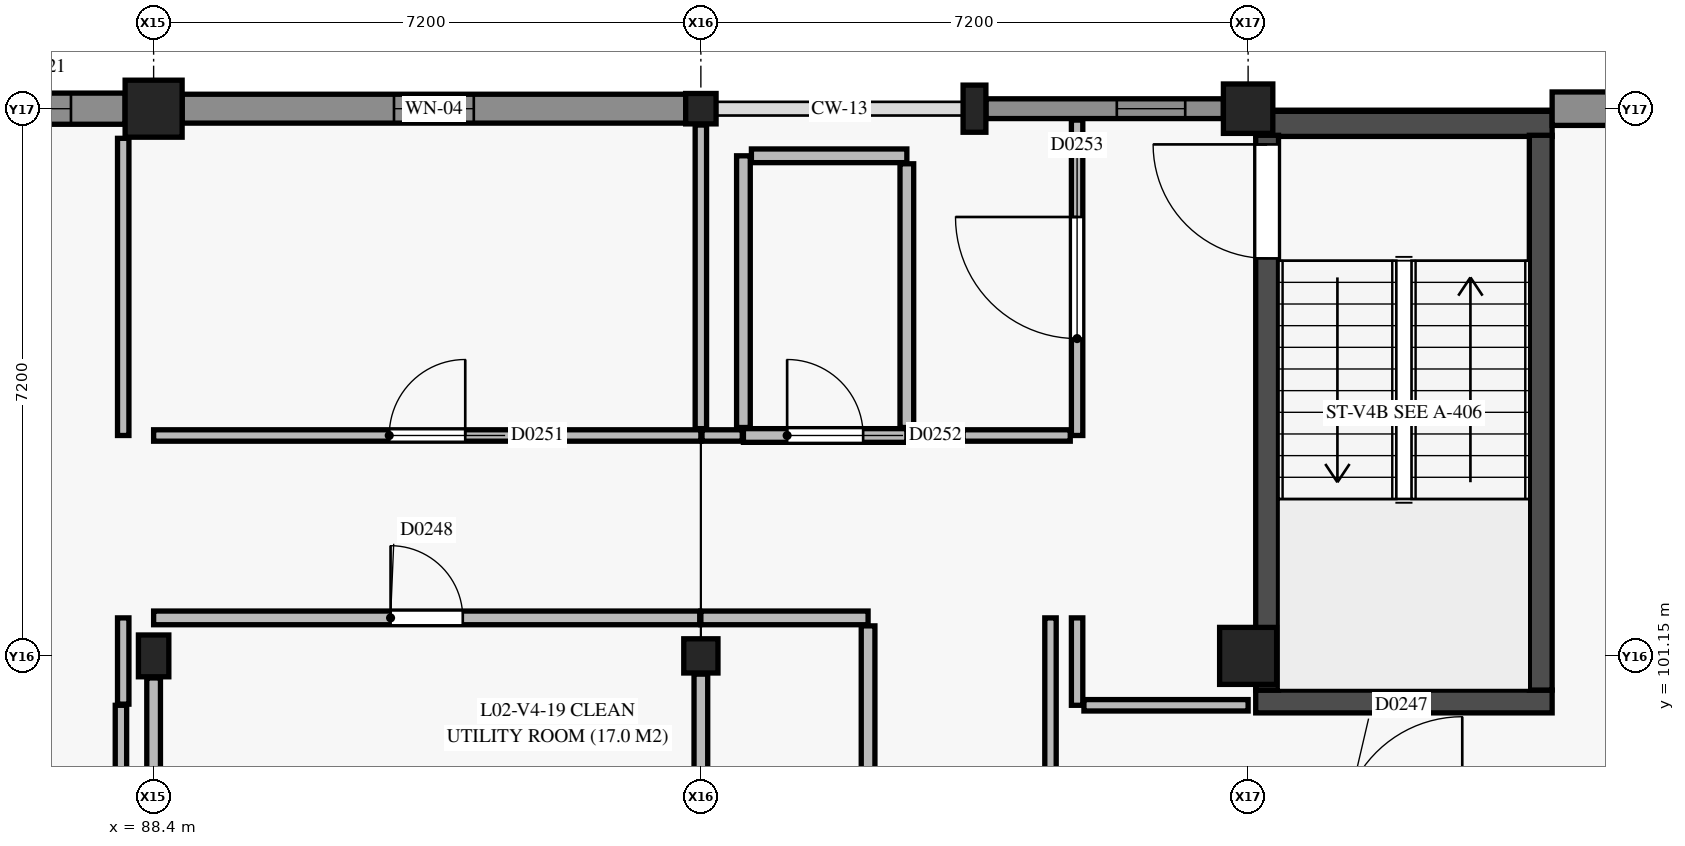
"""IFC4 building model, lengths in metres.
Left out: names, types, materials, properties, quantities, classifications, styles, units other than length and angle.
Written with IfcOpenShell. Run it as: python <this file> out.ifc"""

import sys

from ifc_helpers import new_model, si_unit, direction, frame, frame_2d, origin, origin_2d, place, context, subcontext, project, spatial, rectangle, circle, extrude, element, fill, save


model = new_model("IFC4")
c1 = context("Model", 3, precision=1e-05, world=origin(), true_north=direction((0.0, 1.0)))
c2 = subcontext(c1, "Body", "Model", "MODEL_VIEW")
j1 = project(units=[si_unit("LENGTHUNIT", "METRE"), si_unit("PLANEANGLEUNIT", "RADIAN")], contexts=[c1])
p1 = place(None, origin())
s1 = spatial("IfcSite", under=j1, at=p1, CompositionType="ELEMENT")
p2 = place(p1, origin())
s2 = spatial("IfcBuilding", under=s1, at=p2, CompositionType="ELEMENT")
p3 = place(p2, frame((0.0, 0.0, 9.0)))
s3 = spatial("IfcBuildingStorey", under=s2, at=p3, CompositionType="ELEMENT", Elevation=9.0)
p4 = place(p3, frame((88.4, 101.15, 0.0), z_axis=(0.0, 0.0, 1.0), x_axis=(1.0, 0.0, 0.0)))
e1 = element("IfcColumn", 1, at=p4, inside=s3, PredefinedType="COLUMN", context=c2, shape_type="SweptSolid", body=[
    extrude(rectangle(XDim=0.4, YDim=0.55, at=origin_2d()), origin(), (0.0, 0.0, 1.0), 4.2),
])
p5 = place(p3, frame((88.4, 108.35, 0.0), z_axis=(0.0, 0.0, 1.0), x_axis=(1.0, 0.0, 0.0)))
e2 = element("IfcColumn", 2, at=p5, inside=s3, PredefinedType="COLUMN", context=c2, shape_type="SweptSolid", body=[
    extrude(rectangle(XDim=0.75, YDim=0.75, at=origin_2d()), origin(), (0.0, 0.0, 1.0), 4.2),
])
p6 = place(p3, frame((95.6, 101.15, 0.0), z_axis=(0.0, 0.0, 1.0), x_axis=(1.0, 0.0, 0.0)))
e3 = element("IfcColumn", 3, at=p6, inside=s3, PredefinedType="COLUMN", context=c2, shape_type="SweptSolid", body=[
    extrude(rectangle(XDim=0.45, YDim=0.45, at=origin_2d()), origin(), (0.0, 0.0, 1.0), 4.2),
])
p7 = place(p3, frame((95.6, 108.35, 0.0), z_axis=(0.0, 0.0, 1.0), x_axis=(1.0, 0.0, 0.0)))
e4 = element("IfcColumn", 4, at=p7, inside=s3, PredefinedType="COLUMN", context=c2, shape_type="SweptSolid", body=[
    extrude(rectangle(XDim=0.4, YDim=0.4, at=origin_2d()), origin(), (0.0, 0.0, 1.0), 4.2),
])
p8 = place(p3, frame((102.8, 101.15, 0.0), z_axis=(0.0, 0.0, 1.0), x_axis=(1.0, 0.0, 0.0)))
e5 = element("IfcColumn", 5, at=p8, inside=s3, PredefinedType="COLUMN", context=c2, shape_type="SweptSolid", body=[
    extrude(rectangle(XDim=0.75, YDim=0.75, at=origin_2d()), origin(), (0.0, 0.0, 1.0), 4.2),
])
p9 = place(p3, frame((102.8, 108.35, 0.0), z_axis=(0.0, 0.0, 1.0), x_axis=(1.0, 0.0, 0.0)))
e6 = element("IfcColumn", 6, at=p9, inside=s3, PredefinedType="COLUMN", context=c2, shape_type="SweptSolid", body=[
    extrude(circle(Radius=0.325, at=origin_2d()), origin(), (0.0, 0.0, 1.0), 4.2),
])
p10 = place(p3, frame((99.2, 108.35, 0.0), z_axis=(0.0, 0.0, 1.0), x_axis=(1.0, 0.0, 0.0)))
e7 = element("IfcColumn", 7, at=p10, inside=s3, PredefinedType="PILASTER", context=c2, shape_type="SweptSolid", body=[
    extrude(rectangle(XDim=0.3, YDim=0.62, at=origin_2d()), origin(), (0.0, 0.0, 1.0), 4.2),
])
p11 = place(p3, frame((102.9, 100.55, 0.0), z_axis=(0.0, 0.0, 1.0), x_axis=(1.0, 0.0, 0.0)))
e8 = element("IfcWall", 8, at=p11, inside=s3, PredefinedType="SHEAR", context=c2, shape_type="SweptSolid", body=[
    extrude(rectangle(XDim=3.9, YDim=0.3, at=frame_2d((1.95, 0.0))), origin(), (0.0, 0.0, 1.0), 3.95),
])
p12 = place(p3, frame((102.9, 108.15, 0.0), z_axis=(0.0, 0.0, 1.0), x_axis=(1.0, 0.0, 0.0)))
e9 = element("IfcWall", 9, at=p12, inside=s3, PredefinedType="SHEAR", context=c2, shape_type="SweptSolid", body=[
    extrude(rectangle(XDim=3.9, YDim=0.33, at=frame_2d((1.95, 0.0))), origin(), (0.0, 0.0, 1.0), 3.95),
])
p13 = place(p3, frame((103.05, 100.7, 0.0), z_axis=(0.0, 0.0, 1.0), x_axis=(0.0, 1.0, 0.0)))
e10 = element("IfcWall", 10, at=p13, inside=s3, PredefinedType="SHEAR", context=c2, shape_type="SweptSolid", body=[
    extrude(rectangle(XDim=7.3, YDim=0.3, at=frame_2d((3.65, 0.0))), origin(), (0.0, 0.0, 1.0), 3.95),
])
p14 = place(p13, frame((5.68, 0.0, 0.0)))
e11 = element("IfcOpeningElement", 11, at=p14, cuts=e10, PredefinedType="OPENING", context=c2, shape_type="SweptSolid", body=[
    extrude(rectangle(XDim=1.5, YDim=2.15, at=frame_2d((0.75, 1.075))), frame((0.0, 0.16, 0.0), z_axis=(0.0, -1.0, 0.0), x_axis=(1.0, 0.0, 0.0)), (0.0, 0.0, 1.0), 0.32),
])
p15 = place(p3, frame((106.65, 100.7, 0.0), z_axis=(0.0, 0.0, 1.0), x_axis=(0.0, 1.0, 0.0)))
e12 = element("IfcWall", 12, at=p15, inside=s3, PredefinedType="SHEAR", context=c2, shape_type="SweptSolid", body=[
    extrude(rectangle(XDim=7.3, YDim=0.3, at=frame_2d((3.65, 0.0))), origin(), (0.0, 0.0, 1.0), 3.95),
])
p16 = place(p3, frame((85.7, 108.35, 0.0), z_axis=(0.0, 0.0, 1.0), x_axis=(1.0, 0.0, 0.0)))
e13 = element("IfcWall", 13, at=p16, inside=s3, PredefinedType="USERDEFINED", context=c2, shape_type="SweptSolid", body=[
    extrude(rectangle(XDim=2.325, YDim=0.41, at=frame_2d((1.163, 0.0))), origin(), (0.0, 0.0, 1.0), 3.13),
])
p17 = place(p16, frame((0.712, 0.0, 0.95)))
e14 = element("IfcOpeningElement", 14, at=p17, cuts=e13, PredefinedType="OPENING", context=c2, shape_type="SweptSolid", body=[
    extrude(rectangle(XDim=0.9, YDim=1.2, at=frame_2d((0.45, 0.6))), frame((0.0, 0.215, 0.0), z_axis=(0.0, -1.0, 0.0), x_axis=(1.0, 0.0, 0.0)), (0.0, 0.0, 1.0), 0.43),
])
p18 = place(p3, frame((88.775, 108.35, 0.0), z_axis=(0.0, 0.0, 1.0), x_axis=(1.0, 0.0, 0.0)))
e15 = element("IfcWall", 15, at=p18, inside=s3, PredefinedType="USERDEFINED", context=c2, shape_type="SweptSolid", body=[
    extrude(rectangle(XDim=6.625, YDim=0.38, at=frame_2d((3.312, 0.0))), origin(), (0.0, 0.0, 1.0), 3.13),
])
p19 = place(p18, frame((2.788, 0.0, 0.9)))
e16 = element("IfcOpeningElement", 16, at=p19, cuts=e15, PredefinedType="OPENING", context=c2, shape_type="SweptSolid", body=[
    extrude(rectangle(XDim=1.05, YDim=1.8, at=frame_2d((0.525, 0.9))), frame((0.0, 0.2, 0.0), z_axis=(0.0, -1.0, 0.0), x_axis=(1.0, 0.0, 0.0)), (0.0, 0.0, 1.0), 0.4),
])
p20 = place(p3, frame((99.35, 108.35, 0.0), z_axis=(0.0, 0.0, 1.0), x_axis=(1.0, 0.0, 0.0)))
e17 = element("IfcWall", 17, at=p20, inside=s3, PredefinedType="SOLIDWALL", context=c2, shape_type="SweptSolid", body=[
    extrude(rectangle(XDim=3.125, YDim=0.26, at=frame_2d((1.562, 0.0))), origin(), (0.0, 0.0, 1.0), 3.13),
])
p21 = place(p20, frame((1.722, 0.0, 0.95)))
e18 = element("IfcOpeningElement", 18, at=p21, cuts=e17, PredefinedType="OPENING", context=c2, shape_type="SweptSolid", body=[
    extrude(rectangle(XDim=0.9, YDim=1.2, at=frame_2d((0.45, 0.6))), frame((0.0, 0.14, 0.0), z_axis=(0.0, -1.0, 0.0), x_axis=(1.0, 0.0, 0.0)), (0.0, 0.0, 1.0), 0.28),
])
p22 = place(p3, frame((106.8, 108.35, 0.0), z_axis=(0.0, 0.0, 1.0), x_axis=(1.0, 0.0, 0.0)))
e19 = element("IfcWall", 19, at=p22, inside=s3, PredefinedType="USERDEFINED", context=c2, shape_type="SweptSolid", body=[
    extrude(rectangle(XDim=2.95, YDim=0.44, at=frame_2d((1.475, 0.0))), origin(), (0.0, 0.0, 1.0), 3.13),
])
p23 = place(p22, frame((1.025, 0.0, 0.9)))
e20 = element("IfcOpeningElement", 20, at=p23, cuts=e19, PredefinedType="OPENING", context=c2, shape_type="SweptSolid", body=[
    extrude(rectangle(XDim=0.9, YDim=1.2, at=frame_2d((0.45, 0.6))), frame((0.0, 0.23, 0.0), z_axis=(0.0, -1.0, 0.0), x_axis=(1.0, 0.0, 0.0)), (0.0, 0.0, 1.0), 0.46),
])
p24 = place(p3, frame((96.16, 104.05, 0.0), z_axis=(0.0, 0.0, 1.0), x_axis=(1.0, 0.0, 0.0)))
e21 = element("IfcWall", 21, at=p24, inside=s3, PredefinedType="PLUMBINGWALL", context=c2, shape_type="SweptSolid", body=[
    extrude(rectangle(XDim=2.15, YDim=0.18, at=frame_2d((1.075, 0.0))), origin(), (0.0, 0.0, 1.0), 3.95),
])
p25 = place(p24, frame((0.575, 0.0, 0.0)))
e22 = element("IfcOpeningElement", 22, at=p25, cuts=e21, PredefinedType="OPENING", context=c2, shape_type="SweptSolid", body=[
    extrude(rectangle(XDim=1.0, YDim=2.15, at=frame_2d((0.5, 1.075))), frame((0.0, 0.1, 0.0), z_axis=(0.0, -1.0, 0.0), x_axis=(1.0, 0.0, 0.0)), (0.0, 0.0, 1.0), 0.2),
])
p26 = place(p3, frame((96.16, 104.155, 0.0), z_axis=(0.0, 0.0, 1.0), x_axis=(0.0, 1.0, 0.0)))
e23 = element("IfcWall", 23, at=p26, inside=s3, PredefinedType="PLUMBINGWALL", context=c2, shape_type="SweptSolid", body=[
    extrude(rectangle(XDim=3.575, YDim=0.18, at=frame_2d((1.788, 0.0))), origin(), (0.0, 0.0, 1.0), 3.475),
])
p27 = place(p3, frame((96.265, 107.73, 0.0), z_axis=(0.0, 0.0, 1.0), x_axis=(1.0, 0.0, 0.0)))
e24 = element("IfcWall", 24, at=p27, inside=s3, PredefinedType="PLUMBINGWALL", context=c2, shape_type="SweptSolid", body=[
    extrude(rectangle(XDim=2.045, YDim=0.18, at=frame_2d((1.022, 0.0))), origin(), (0.0, 0.0, 1.0), 3.95),
])
p28 = place(p3, frame((98.31, 104.155, 0.0), z_axis=(0.0, 0.0, 1.0), x_axis=(0.0, 1.0, 0.0)))
e25 = element("IfcWall", 25, at=p28, inside=s3, PredefinedType="PLUMBINGWALL", context=c2, shape_type="SweptSolid", body=[
    extrude(rectangle(XDim=3.47, YDim=0.18, at=frame_2d((1.735, 0.0))), origin(), (0.0, 0.0, 1.0), 3.475),
])
p29 = place(p3, frame((95.6, 101.65, 0.0), z_axis=(0.0, 0.0, 1.0), x_axis=(1.0, 0.0, 0.0)))
e26 = element("IfcWall", 26, at=p29, inside=s3, PredefinedType="PLUMBINGWALL", context=c2, shape_type="SweptSolid", body=[
    extrude(rectangle(XDim=2.2, YDim=0.18, at=frame_2d((1.1, 0.0))), origin(), (0.0, 0.0, 1.0), 3.285),
])
p30 = place(p3, frame((97.8, 94.4, 0.0), z_axis=(0.0, 0.0, 1.0), x_axis=(0.0, 1.0, 0.0)))
e27 = element("IfcWall", 27, at=p30, inside=s3, PredefinedType="PLUMBINGWALL", context=c2, shape_type="SweptSolid", body=[
    extrude(rectangle(XDim=7.145, YDim=0.18, at=frame_2d((3.573, 0.0))), origin(), (0.0, 0.0, 1.0), 3.135),
])
p31 = place(p30, frame((3.097, 0.0, 0.0)))
e28 = element("IfcOpeningElement", 28, at=p31, cuts=e27, PredefinedType="OPENING", context=c2, shape_type="SweptSolid", body=[
    extrude(rectangle(XDim=0.95, YDim=2.1, at=frame_2d((0.475, 1.05))), frame((0.0, 0.1, 0.0), z_axis=(0.0, -1.0, 0.0), x_axis=(1.0, 0.0, 0.0)), (0.0, 0.0, 1.0), 0.2),
])
p32 = place(p3, frame((88.4, 101.65, 0.0), z_axis=(0.0, 0.0, 1.0), x_axis=(1.0, 0.0, 0.0)))
e29 = element("IfcWall", 29, at=p32, inside=s3, PredefinedType="PLUMBINGWALL", context=c2, shape_type="SweptSolid", body=[
    extrude(rectangle(XDim=7.185, YDim=0.18, at=frame_2d((3.593, 0.0))), origin(), (0.0, 0.0, 1.0), 3.135),
])
p33 = place(p32, frame((3.117, 0.0, 0.0)))
e30 = element("IfcOpeningElement", 30, at=p33, cuts=e29, PredefinedType="OPENING", context=c2, shape_type="SweptSolid", body=[
    extrude(rectangle(XDim=0.95, YDim=2.1, at=frame_2d((0.475, 1.05))), frame((0.0, 0.1, 0.0), z_axis=(0.0, -1.0, 0.0), x_axis=(1.0, 0.0, 0.0)), (0.0, 0.0, 1.0), 0.2),
])
for number, where, z_axis, x_axis in (
    (31, (87.97, 99.365, 0.0), (0.0, 0.0, 1.0), (0.0, 1.0, 0.0)),
    (32, (88.0, 100.515, 0.0), (0.0, 0.0, 1.0), (0.0, 1.0, 0.0)),
):
    element("IfcWall", number, at=place(p3, frame(where, z_axis=z_axis, x_axis=x_axis)), inside=s3, PredefinedType="PARTITIONING", context=c2, shape_type="SweptSolid", body=[
        extrude(rectangle(XDim=1.135, YDim=0.15, at=frame_2d((0.567, 0.0))), origin(), (0.0, 0.0, 1.0), 3.95),
    ])
p34 = place(p3, frame((100.55, 100.5, 0.0), z_axis=(0.0, 0.0, 1.0), x_axis=(0.0, 1.0, 0.0)))
e33 = element("IfcWall", 33, at=p34, inside=s3, PredefinedType="PARTITIONING", context=c2, shape_type="SweptSolid", body=[
    extrude(rectangle(XDim=1.15, YDim=0.15, at=frame_2d((0.575, 0.0))), origin(), (0.0, 0.0, 1.0), 3.135),
])
p35 = place(p3, frame((100.64, 100.5, 0.0), z_axis=(0.0, 0.0, 1.0), x_axis=(1.0, 0.0, 0.0)))
e34 = element("IfcWall", 34, at=p35, inside=s3, PredefinedType="PARTITIONING", context=c2, shape_type="SweptSolid", body=[
    extrude(rectangle(XDim=2.16, YDim=0.15, at=frame_2d((1.08, 0.0))), origin(), (0.0, 0.0, 1.0), 3.415),
])
p36 = place(p3, frame((100.2, 98.84, 0.0), z_axis=(0.0, 0.0, 1.0), x_axis=(0.0, 1.0, 0.0)))
e35 = element("IfcWall", 35, at=p36, inside=s3, PredefinedType="PARTITIONING", context=c2, shape_type="SweptSolid", body=[
    extrude(rectangle(XDim=2.81, YDim=0.15, at=frame_2d((1.405, 0.0))), origin(), (0.0, 0.0, 1.0), 3.135),
])
p37 = place(p3, frame((88.0, 104.05, 0.0), z_axis=(0.0, 0.0, 1.0), x_axis=(0.0, 1.0, 0.0)))
e36 = element("IfcWall", 36, at=p37, inside=s3, PredefinedType="PARTITIONING", context=c2, shape_type="SweptSolid", body=[
    extrude(rectangle(XDim=3.91, YDim=0.15, at=frame_2d((1.955, 0.0))), origin(), (0.0, 0.0, 1.0), 3.95),
])
p38 = place(p3, frame((88.4, 104.05, 0.0), z_axis=(0.0, 0.0, 1.0), x_axis=(1.0, 0.0, 0.0)))
e37 = element("IfcWall", 37, at=p38, inside=s3, PredefinedType="PARTITIONING", context=c2, shape_type="SweptSolid", body=[
    extrude(rectangle(XDim=7.2, YDim=0.15, at=frame_2d((3.6, 0.0))), origin(), (0.0, 0.0, 1.0), 3.135),
])
p39 = place(p38, frame((3.1, 0.0, 0.0)))
e38 = element("IfcOpeningElement", 38, at=p39, cuts=e37, PredefinedType="OPENING", context=c2, shape_type="SweptSolid", body=[
    extrude(rectangle(XDim=1.0, YDim=2.15, at=frame_2d((0.5, 1.075))), frame((0.0, 0.085, 0.0), z_axis=(0.0, -1.0, 0.0), x_axis=(1.0, 0.0, 0.0)), (0.0, 0.0, 1.0), 0.17),
])
p40 = place(p3, frame((100.55, 104.05, 0.0), z_axis=(0.0, 0.0, 1.0), x_axis=(0.0, 1.0, 0.0)))
e39 = element("IfcWall", 39, at=p40, inside=s3, PredefinedType="PARTITIONING", context=c2, shape_type="SweptSolid", body=[
    extrude(rectangle(XDim=4.15, YDim=0.15, at=frame_2d((2.075, 0.0))), origin(), (0.0, 0.0, 1.0), 3.475),
])
p41 = place(p40, frame((1.275, 0.0, 0.0)))
e40 = element("IfcOpeningElement", 40, at=p41, cuts=e39, PredefinedType="OPENING", context=c2, shape_type="SweptSolid", body=[
    extrude(rectangle(XDim=1.6, YDim=2.25, at=frame_2d((0.8, 1.125))), frame((0.0, 0.085, 0.0), z_axis=(0.0, -1.0, 0.0), x_axis=(1.0, 0.0, 0.0)), (0.0, 0.0, 1.0), 0.17),
])
p42 = place(p3, frame((99.05, 104.05, 0.0), z_axis=(0.0, 0.0, 1.0), x_axis=(1.0, 0.0, 0.0)))
e41 = element("IfcWall", 41, at=p42, inside=s3, PredefinedType="PARTITIONING", context=c2, shape_type="SweptSolid", body=[
    extrude(rectangle(XDim=1.41, YDim=0.15, at=frame_2d((0.705, 0.0))), origin(), (0.0, 0.0, 1.0), 3.95),
])
p43 = place(p3, frame((98.325, 104.05, 0.0), z_axis=(0.0, 0.0, 1.0), x_axis=(1.0, 0.0, 0.0)))
e42 = element("IfcWall", 42, at=p43, inside=s3, PredefinedType="PARTITIONING", context=c2, shape_type="SweptSolid", body=[
    extrude(rectangle(XDim=0.71, YDim=0.15, at=frame_2d((0.355, 0.0))), origin(), (0.0, 0.0, 1.0), 3.95),
])
p44 = place(p3, frame((95.615, 104.05, 0.0), z_axis=(0.0, 0.0, 1.0), x_axis=(1.0, 0.0, 0.0)))
e43 = element("IfcWall", 43, at=p44, inside=s3, PredefinedType="PARTITIONING", context=c2, shape_type="SweptSolid", body=[
    extrude(rectangle(XDim=0.53, YDim=0.15, at=frame_2d((0.265, 0.0))), origin(), (0.0, 0.0, 1.0), 3.285),
])
p45 = place(p3, frame((88.4, 99.465, 0.0), z_axis=(0.0, 0.0, 1.0), x_axis=(0.0, 1.0, 0.0)))
e44 = element("IfcWall", 44, at=p45, inside=s3, PredefinedType="PLUMBINGWALL", context=c2, shape_type="SweptSolid", body=[
    extrude(rectangle(XDim=1.395, YDim=0.18, at=frame_2d((0.698, 0.0))), origin(), (0.0, 0.0, 1.0), 3.385),
])
p46 = place(p3, frame((95.6, 99.055, 0.0), z_axis=(0.0, 0.0, 1.0), x_axis=(0.0, 1.0, 0.0)))
e45 = element("IfcWall", 45, at=p46, inside=s3, PredefinedType="PLUMBINGWALL", context=c2, shape_type="SweptSolid", body=[
    extrude(rectangle(XDim=1.855, YDim=0.18, at=frame_2d((0.927, 0.0))), origin(), (0.0, 0.0, 1.0), 3.285),
])
p47 = place(p3, frame((95.6, 104.14, 0.0), z_axis=(0.0, 0.0, 1.0), x_axis=(0.0, 1.0, 0.0)))
e46 = element("IfcWall", 46, at=p47, inside=s3, PredefinedType="PARTITIONING", context=c2, shape_type="SweptSolid", body=[
    extrude(rectangle(XDim=3.995, YDim=0.15, at=frame_2d((1.998, 0.0))), origin(), (0.0, 0.0, 1.0), 3.285),
])
p48 = place(p17, origin())
e47 = element("IfcWindow", 47, at=p48, inside=s3, PartitioningType="SINGLE_PANEL", PredefinedType="WINDOW", context=c2, shape_type="SweptSolid", body=[
    extrude(rectangle(XDim=0.9, YDim=1.2, at=frame_2d((0.45, 0.6))), frame((0.0, 0.03, 0.0), z_axis=(0.0, -1.0, 0.0), x_axis=(1.0, 0.0, 0.0)), (0.0, 0.0, 1.0), 0.06),
])
fill(e14, e47)
p49 = place(p19, origin())
e48 = element("IfcWindow", 48, at=p49, inside=s3, PartitioningType="SINGLE_PANEL", PredefinedType="WINDOW", context=c2, shape_type="SweptSolid", body=[
    extrude(rectangle(XDim=1.05, YDim=1.8, at=frame_2d((0.525, 0.9))), frame((0.0, 0.03, 0.0), z_axis=(0.0, -1.0, 0.0), x_axis=(1.0, 0.0, 0.0)), (0.0, 0.0, 1.0), 0.06),
])
fill(e16, e48)
p50 = place(p21, origin())
e49 = element("IfcWindow", 49, at=p50, inside=s3, PartitioningType="SINGLE_PANEL", PredefinedType="WINDOW", context=c2, shape_type="SweptSolid", body=[
    extrude(rectangle(XDim=0.9, YDim=1.2, at=frame_2d((0.45, 0.6))), frame((0.0, 0.03, 0.0), z_axis=(0.0, -1.0, 0.0), x_axis=(1.0, 0.0, 0.0)), (0.0, 0.0, 1.0), 0.06),
])
fill(e18, e49)
p51 = place(p14, origin())
e50 = element("IfcDoor", 50, at=p51, inside=s3, OperationType="SINGLE_SWING_RIGHT", PredefinedType="DOOR", context=c2, shape_type="SweptSolid", body=[
    extrude(rectangle(XDim=1.5, YDim=2.15, at=frame_2d((0.75, 1.075))), frame((0.0, 0.025, 0.0), z_axis=(0.0, -1.0, 0.0), x_axis=(1.0, 0.0, 0.0)), (0.0, 0.0, 1.0), 0.05),
])
fill(e11, e50)
p52 = place(p33, origin())
e51 = element("IfcDoor", 51, at=p52, inside=s3, OperationType="SINGLE_SWING_LEFT", PredefinedType="DOOR", context=c2, shape_type="SweptSolid", body=[
    extrude(rectangle(XDim=0.95, YDim=2.1, at=frame_2d((0.475, 1.05))), frame((0.0, 0.025, 0.0), z_axis=(0.0, -1.0, 0.0), x_axis=(1.0, 0.0, 0.0)), (0.0, 0.0, 1.0), 0.05),
])
fill(e30, e51)
p53 = place(p39, origin())
e52 = element("IfcDoor", 52, at=p53, inside=s3, OperationType="SINGLE_SWING_RIGHT", PredefinedType="DOOR", context=c2, shape_type="SweptSolid", body=[
    extrude(rectangle(XDim=1.0, YDim=2.15, at=frame_2d((0.5, 1.075))), frame((0.0, 0.025, 0.0), z_axis=(0.0, -1.0, 0.0), x_axis=(1.0, 0.0, 0.0)), (0.0, 0.0, 1.0), 0.05),
])
fill(e38, e52)
p54 = place(p25, origin())
e53 = element("IfcDoor", 53, at=p54, inside=s3, OperationType="SINGLE_SWING_LEFT", PredefinedType="DOOR", context=c2, shape_type="SweptSolid", body=[
    extrude(rectangle(XDim=1.0, YDim=2.15, at=frame_2d((0.5, 1.075))), frame((0.0, 0.025, 0.0), z_axis=(0.0, -1.0, 0.0), x_axis=(1.0, 0.0, 0.0)), (0.0, 0.0, 1.0), 0.05),
])
fill(e22, e53)
p55 = place(p41, origin())
e54 = element("IfcDoor", 54, at=p55, inside=s3, OperationType="SINGLE_SWING_RIGHT", PredefinedType="DOOR", context=c2, shape_type="SweptSolid", body=[
    extrude(rectangle(XDim=1.6, YDim=2.25, at=frame_2d((0.8, 1.125))), frame((0.0, 0.025, 0.0), z_axis=(0.0, -1.0, 0.0), x_axis=(1.0, 0.0, 0.0)), (0.0, 0.0, 1.0), 0.05),
])
fill(e40, e54)
save(model, sys.argv[1])
